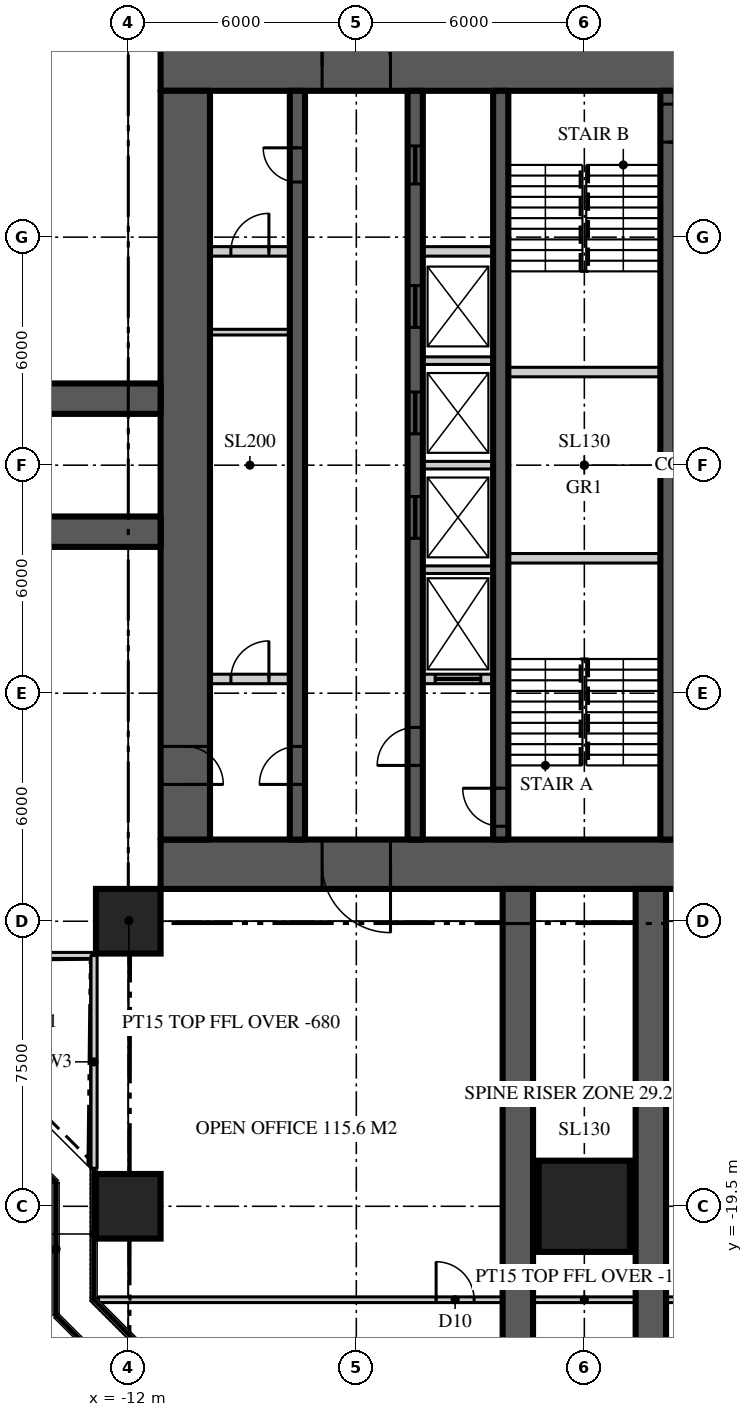
"""IFC4 building model, lengths in metres.
Left out: names, types, materials, properties, quantities, classifications, styles, units other than length and angle.
Written with IfcOpenShell. Run it as: python <this file> out.ifc"""

import sys

from ifc_helpers import new_model, si_unit, direction, frame, frame_2d, origin, origin_2d, place, context, subcontext, project, spatial, rectangle, extrude, element, fill, save


model = new_model("IFC4")
c1 = context("Model", 3, precision=1e-05, world=origin(), true_north=direction((0.0, 1.0)))
c2 = subcontext(c1, "Body", "Model", "MODEL_VIEW")
j1 = project(units=[si_unit("LENGTHUNIT", "METRE"), si_unit("PLANEANGLEUNIT", "RADIAN")], contexts=[c1])
p1 = place(None, origin())
s1 = spatial("IfcSite", under=j1, at=p1, CompositionType="ELEMENT")
p2 = place(p1, origin())
s2 = spatial("IfcBuilding", under=s1, at=p2, CompositionType="ELEMENT")
p3 = place(p2, frame((0.0, 0.0, 178.8)))
s3 = spatial("IfcBuildingStorey", under=s2, at=p3, CompositionType="ELEMENT", Elevation=178.8)
p4 = place(p3, frame((-11.15, 10.5, 0.0), z_axis=(0.0, 0.0, 1.0), x_axis=(1.0, 0.0, 0.0)))
e1 = element("IfcWall", 1, at=p4, inside=s3, PredefinedType="SHEAR", context=c2, shape_type="SweptSolid", body=[
    extrude(rectangle(XDim=22.3, YDim=1.3, at=frame_2d((11.15, 0.0))), origin(), (0.0, 0.0, 1.0), 3.9),
])
p5 = place(p4, frame((4.25, 0.0, 0.0)))
e2 = element("IfcOpeningElement", 2, at=p5, cuts=e1, PredefinedType="OPENING", context=c2, shape_type="SweptSolid", body=[
    extrude(rectangle(XDim=1.8, YDim=2.2, at=frame_2d((0.9, 1.1))), frame((0.0, 0.66, 0.0), z_axis=(0.0, -1.0, 0.0), x_axis=(1.0, 0.0, 0.0)), (0.0, 0.0, 1.0), 1.32),
])
p6 = place(p4, frame((16.25, 0.0, 0.0)))
e3 = element("IfcOpeningElement", 3, at=p6, cuts=e1, PredefinedType="OPENING", context=c2, shape_type="SweptSolid", body=[
    extrude(rectangle(XDim=1.8, YDim=2.2, at=frame_2d((0.9, 1.1))), frame((0.0, 0.66, 0.0), z_axis=(0.0, -1.0, 0.0), x_axis=(1.0, 0.0, 0.0)), (0.0, 0.0, 1.0), 1.32),
])
p7 = place(p3, frame((11.15, -10.5, 0.0), z_axis=(0.0, 0.0, 1.0), x_axis=(-1.0, 0.0, 0.0)))
e4 = element("IfcWall", 4, at=p7, inside=s3, PredefinedType="SHEAR", context=c2, shape_type="SweptSolid", body=[
    extrude(rectangle(XDim=22.3, YDim=1.3, at=frame_2d((11.15, 0.0))), origin(), (0.0, 0.0, 1.0), 3.9),
])
p8 = place(p7, frame((16.25, 0.0, 0.0)))
e5 = element("IfcOpeningElement", 5, at=p8, cuts=e4, PredefinedType="OPENING", context=c2, shape_type="SweptSolid", body=[
    extrude(rectangle(XDim=1.8, YDim=2.2, at=frame_2d((0.9, 1.1))), frame((0.0, 0.66, 0.0), z_axis=(0.0, -1.0, 0.0), x_axis=(1.0, 0.0, 0.0)), (0.0, 0.0, 1.0), 1.32),
])
p9 = place(p7, frame((4.25, 0.0, 0.0)))
e6 = element("IfcOpeningElement", 6, at=p9, cuts=e4, PredefinedType="OPENING", context=c2, shape_type="SweptSolid", body=[
    extrude(rectangle(XDim=1.8, YDim=2.2, at=frame_2d((0.9, 1.1))), frame((0.0, 0.66, 0.0), z_axis=(0.0, -1.0, 0.0), x_axis=(1.0, 0.0, 0.0)), (0.0, 0.0, 1.0), 1.32),
])
p10 = place(p3, frame((-10.5, 9.85, 0.0), z_axis=(0.0, 0.0, 1.0), x_axis=(0.0, -1.0, 0.0)))
e7 = element("IfcWall", 7, at=p10, inside=s3, PredefinedType="SHEAR", context=c2, shape_type="SweptSolid", body=[
    extrude(rectangle(XDim=19.7, YDim=1.3, at=frame_2d((9.85, 0.0))), origin(), (0.0, 0.0, 1.0), 3.9),
])
p11 = place(p10, frame((17.25, 0.0, 0.0)))
e8 = element("IfcOpeningElement", 8, at=p11, cuts=e7, PredefinedType="OPENING", context=c2, shape_type="SweptSolid", body=[
    extrude(rectangle(XDim=1.0, YDim=2.2, at=frame_2d((0.5, 1.1))), frame((0.0, 0.66, 0.0), z_axis=(0.0, -1.0, 0.0), x_axis=(1.0, 0.0, 0.0)), (0.0, 0.0, 1.0), 1.32),
])
for number, where, z_axis, x_axis in (
    (9, (-11.15, 1.75, 0.0), (0.0, 0.0, 1.0), (-1.0, 0.0, 0.0)),
    (10, (-11.15, -1.75, 0.0), (0.0, 0.0, 1.0), (-1.0, 0.0, 0.0)),
    (11, (-1.75, -11.15, 0.0), (0.0, 0.0, 1.0), (0.0, -1.0, 0.0)),
    (12, (1.75, -11.15, 0.0), (0.0, 0.0, 1.0), (0.0, -1.0, 0.0)),
):
    element("IfcWall", number, at=place(p3, frame(where, z_axis=z_axis, x_axis=x_axis)), inside=s3, PredefinedType="SHEAR", context=c2, shape_type="SweptSolid", body=[
        extrude(rectangle(XDim=15.25, YDim=0.8, at=frame_2d((7.625, 0.0))), origin(), (0.0, 0.0, 1.0), 3.9),
    ])
p12 = place(p3, frame((-12.0, -19.5, 0.0), z_axis=(0.0, 0.0, 1.0), x_axis=(1.0, 0.0, 0.0)))
e13 = element("IfcColumn", 13, at=p12, inside=s3, PredefinedType="COLUMN", context=c2, shape_type="SweptSolid", body=[
    extrude(rectangle(XDim=1.7, YDim=1.7, at=origin_2d()), origin(), (0.0, 0.0, 1.0), 3.9),
])
p13 = place(p3, frame((0.0, -19.5, 0.0), z_axis=(0.0, 0.0, 1.0), x_axis=(1.0, 0.0, 0.0)))
e14 = element("IfcColumn", 14, at=p13, inside=s3, PredefinedType="COLUMN", context=c2, shape_type="SweptSolid", body=[
    extrude(rectangle(XDim=2.4, YDim=2.4, at=origin_2d()), origin(), (0.0, 0.0, 1.0), 3.9),
])
p14 = place(p3, frame((-12.0, -12.0, 0.0), z_axis=(0.0, 0.0, 1.0), x_axis=(1.0, 0.0, 0.0)))
e15 = element("IfcColumn", 15, at=p14, inside=s3, PredefinedType="COLUMN", context=c2, shape_type="SweptSolid", body=[
    extrude(rectangle(XDim=1.7, YDim=1.7, at=origin_2d()), origin(), (0.0, 0.0, 1.0), 3.9),
])
p15 = place(p3, frame((-18.5, -12.9, 0.0), z_axis=(0.0, 0.0, 1.0), x_axis=(1.0, 0.0, 0.0)))
e16 = element("IfcWall", 16, at=p15, inside=s3, PredefinedType="SOLIDWALL", context=c2, shape_type="SweptSolid", body=[
    extrude(rectangle(XDim=5.6, YDim=0.16, at=frame_2d((2.8, 0.0))), origin(), (0.0, 0.0, 1.0), 3.77),
])
p16 = place(p15, frame((2.3, 0.0, 0.0)))
e17 = element("IfcOpeningElement", 17, at=p16, cuts=e16, PredefinedType="OPENING", context=c2, shape_type="SweptSolid", body=[
    extrude(rectangle(XDim=1.0, YDim=2.2, at=frame_2d((0.5, 1.1))), frame((0.0, 0.09, 0.0), z_axis=(0.0, -1.0, 0.0), x_axis=(1.0, 0.0, 0.0)), (0.0, 0.0, 1.0), 0.18),
])
p17 = place(p3, frame((-12.9, -12.9, 0.0), z_axis=(0.0, 0.0, 1.0), x_axis=(0.0, -1.0, 0.0)))
e18 = element("IfcWall", 18, at=p17, inside=s3, PredefinedType="SOLIDWALL", context=c2, shape_type="SweptSolid", body=[
    extrude(rectangle(XDim=5.6, YDim=0.16, at=frame_2d((2.8, 0.0))), origin(), (0.0, 0.0, 1.0), 3.77),
])
p18 = place(p3, frame((-7.55, -9.85, 0.0), z_axis=(0.0, 0.0, 1.0), x_axis=(0.0, 1.0, 0.0)))
e19 = element("IfcWall", 19, at=p18, inside=s3, PredefinedType="SHEAR", context=c2, shape_type="SweptSolid", body=[
    extrude(rectangle(XDim=19.7, YDim=0.4, at=frame_2d((9.85, 0.0))), origin(), (0.0, 0.0, 1.0), 3.9),
])
p19 = place(p18, frame((1.45, 0.0, 0.0)))
e20 = element("IfcOpeningElement", 20, at=p19, cuts=e19, PredefinedType="OPENING", context=c2, shape_type="SweptSolid", body=[
    extrude(rectangle(XDim=1.0, YDim=2.2, at=frame_2d((0.5, 1.1))), frame((0.0, 0.21, 0.0), z_axis=(0.0, -1.0, 0.0), x_axis=(1.0, 0.0, 0.0)), (0.0, 0.0, 1.0), 0.42),
])
p20 = place(p18, frame((17.3, 0.0, 0.0)))
e21 = element("IfcOpeningElement", 21, at=p20, cuts=e19, PredefinedType="OPENING", context=c2, shape_type="SweptSolid", body=[
    extrude(rectangle(XDim=0.9, YDim=2.1, at=frame_2d((0.45, 1.05))), frame((0.0, 0.21, 0.0), z_axis=(0.0, -1.0, 0.0), x_axis=(1.0, 0.0, 0.0)), (0.0, 0.0, 1.0), 0.42),
])
p21 = place(p3, frame((-4.45, -9.85, 0.0), z_axis=(0.0, 0.0, 1.0), x_axis=(0.0, 1.0, 0.0)))
e22 = element("IfcWall", 22, at=p21, inside=s3, PredefinedType="SHEAR", context=c2, shape_type="SweptSolid", body=[
    extrude(rectangle(XDim=19.7, YDim=0.4, at=frame_2d((9.85, 0.0))), origin(), (0.0, 0.0, 1.0), 3.9),
])
p22 = place(p21, frame((1.95, 0.0, 0.0)))
e23 = element("IfcOpeningElement", 23, at=p22, cuts=e22, PredefinedType="OPENING", context=c2, shape_type="SweptSolid", body=[
    extrude(rectangle(XDim=1.0, YDim=2.2, at=frame_2d((0.5, 1.1))), frame((0.0, 0.21, 0.0), z_axis=(0.0, -1.0, 0.0), x_axis=(1.0, 0.0, 0.0)), (0.0, 0.0, 1.0), 0.42),
])
p23 = place(p21, frame((17.25, 0.0, 0.0)))
e24 = element("IfcOpeningElement", 24, at=p23, cuts=e22, PredefinedType="OPENING", context=c2, shape_type="SweptSolid", body=[
    extrude(rectangle(XDim=1.0, YDim=2.1, at=frame_2d((0.5, 1.05))), frame((0.0, 0.21, 0.0), z_axis=(0.0, -1.0, 0.0), x_axis=(1.0, 0.0, 0.0)), (0.0, 0.0, 1.0), 0.42),
])
p24 = place(p21, frame((7.925, 0.0, 0.0)))
e25 = element("IfcOpeningElement", 25, at=p24, cuts=e22, PredefinedType="OPENING", context=c2, shape_type="SweptSolid", body=[
    extrude(rectangle(XDim=1.1, YDim=2.2, at=frame_2d((0.55, 1.1))), frame((0.0, 0.21, 0.0), z_axis=(0.0, -1.0, 0.0), x_axis=(1.0, 0.0, 0.0)), (0.0, 0.0, 1.0), 0.42),
])
p25 = place(p21, frame((10.675, 0.0, 0.0)))
e26 = element("IfcOpeningElement", 26, at=p25, cuts=e22, PredefinedType="OPENING", context=c2, shape_type="SweptSolid", body=[
    extrude(rectangle(XDim=1.1, YDim=2.2, at=frame_2d((0.55, 1.1))), frame((0.0, 0.21, 0.0), z_axis=(0.0, -1.0, 0.0), x_axis=(1.0, 0.0, 0.0)), (0.0, 0.0, 1.0), 0.42),
])
p26 = place(p21, frame((13.475, 0.0, 0.0)))
e27 = element("IfcOpeningElement", 27, at=p26, cuts=e22, PredefinedType="OPENING", context=c2, shape_type="SweptSolid", body=[
    extrude(rectangle(XDim=1.1, YDim=2.2, at=frame_2d((0.55, 1.1))), frame((0.0, 0.21, 0.0), z_axis=(0.0, -1.0, 0.0), x_axis=(1.0, 0.0, 0.0)), (0.0, 0.0, 1.0), 0.42),
])
p27 = place(p3, frame((-2.2, -9.85, 0.0), z_axis=(0.0, 0.0, 1.0), x_axis=(0.0, 1.0, 0.0)))
e28 = element("IfcWall", 28, at=p27, inside=s3, PredefinedType="SHEAR", context=c2, shape_type="SweptSolid", body=[
    extrude(rectangle(XDim=19.7, YDim=0.4, at=frame_2d((9.85, 0.0))), origin(), (0.0, 0.0, 1.0), 3.9),
])
p28 = place(p27, frame((0.35, 0.0, 0.0)))
e29 = element("IfcOpeningElement", 29, at=p28, cuts=e28, PredefinedType="OPENING", context=c2, shape_type="SweptSolid", body=[
    extrude(rectangle(XDim=1.0, YDim=2.2, at=frame_2d((0.5, 1.1))), frame((0.0, 0.21, 0.0), z_axis=(0.0, -1.0, 0.0), x_axis=(1.0, 0.0, 0.0)), (0.0, 0.0, 1.0), 0.42),
])
p29 = place(p3, frame((2.2, 9.85, 0.0), z_axis=(0.0, 0.0, 1.0), x_axis=(0.0, -1.0, 0.0)))
e30 = element("IfcWall", 30, at=p29, inside=s3, PredefinedType="SHEAR", context=c2, shape_type="SweptSolid", body=[
    extrude(rectangle(XDim=19.7, YDim=0.4, at=frame_2d((9.85, 0.0))), origin(), (0.0, 0.0, 1.0), 3.9),
])
p30 = place(p29, frame((0.35, 0.0, 0.0)))
e31 = element("IfcOpeningElement", 31, at=p30, cuts=e30, PredefinedType="OPENING", context=c2, shape_type="SweptSolid", body=[
    extrude(rectangle(XDim=1.0, YDim=2.2, at=frame_2d((0.5, 1.1))), frame((0.0, 0.21, 0.0), z_axis=(0.0, -1.0, 0.0), x_axis=(1.0, 0.0, 0.0)), (0.0, 0.0, 1.0), 0.42),
])
p31 = place(p3, frame((-9.85, 5.625, 0.0), z_axis=(0.0, 0.0, 1.0), x_axis=(1.0, 0.0, 0.0)))
e32 = element("IfcWall", 32, at=p31, inside=s3, PredefinedType="SOLIDWALL", context=c2, shape_type="SweptSolid", body=[
    extrude(rectangle(XDim=2.1, YDim=0.25, at=frame_2d((1.05, 0.0))), origin(), (0.0, 0.0, 1.0), 3.7),
])
p32 = place(p31, frame((0.55, 0.0, 0.0)))
e33 = element("IfcOpeningElement", 33, at=p32, cuts=e32, PredefinedType="OPENING", context=c2, shape_type="SweptSolid", body=[
    extrude(rectangle(XDim=1.0, YDim=2.2, at=frame_2d((0.5, 1.1))), frame((0.0, 0.135, 0.0), z_axis=(0.0, -1.0, 0.0), x_axis=(1.0, 0.0, 0.0)), (0.0, 0.0, 1.0), 0.27),
])
p33 = place(p3, frame((-4.25, 5.625, 0.0), z_axis=(0.0, 0.0, 1.0), x_axis=(1.0, 0.0, 0.0)))
e34 = element("IfcWall", 34, at=p33, inside=s3, PredefinedType="SOLIDWALL", context=c2, shape_type="SweptSolid", body=[
    extrude(rectangle(XDim=1.85, YDim=0.25, at=frame_2d((0.925, 0.0))), origin(), (0.0, 0.0, 1.0), 3.7),
])
p34 = place(p3, frame((-9.85, -5.625, 0.0), z_axis=(0.0, 0.0, 1.0), x_axis=(1.0, 0.0, 0.0)))
e35 = element("IfcWall", 35, at=p34, inside=s3, PredefinedType="SOLIDWALL", context=c2, shape_type="SweptSolid", body=[
    extrude(rectangle(XDim=2.1, YDim=0.25, at=frame_2d((1.05, 0.0))), origin(), (0.0, 0.0, 1.0), 3.7),
])
p35 = place(p34, frame((0.55, 0.0, 0.0)))
e36 = element("IfcOpeningElement", 36, at=p35, cuts=e35, PredefinedType="OPENING", context=c2, shape_type="SweptSolid", body=[
    extrude(rectangle(XDim=1.0, YDim=2.2, at=frame_2d((0.5, 1.1))), frame((0.0, 0.135, 0.0), z_axis=(0.0, -1.0, 0.0), x_axis=(1.0, 0.0, 0.0)), (0.0, 0.0, 1.0), 0.27),
])
p36 = place(p3, frame((-4.25, -5.625, 0.0), z_axis=(0.0, 0.0, 1.0), x_axis=(1.0, 0.0, 0.0)))
e37 = element("IfcWall", 37, at=p36, inside=s3, PredefinedType="SOLIDWALL", context=c2, shape_type="SweptSolid", body=[
    extrude(rectangle(XDim=1.85, YDim=0.25, at=frame_2d((0.925, 0.0))), origin(), (0.0, 0.0, 1.0), 3.7),
])
p37 = place(p36, frame((0.325, 0.0, 0.0)))
e38 = element("IfcOpeningElement", 38, at=p37, cuts=e37, PredefinedType="OPENING", context=c2, shape_type="SweptSolid", body=[
    extrude(rectangle(XDim=1.2, YDim=2.2, at=frame_2d((0.6, 1.1))), frame((0.0, 0.135, 0.0), z_axis=(0.0, -1.0, 0.0), x_axis=(1.0, 0.0, 0.0)), (0.0, 0.0, 1.0), 0.27),
])
for number, where, z_axis, x_axis in (
    (39, (-2.0, -2.45, 0.0), (0.0, 0.0, 1.0), (1.0, 0.0, 0.0)),
    (40, (-2.0, 2.45, 0.0), (0.0, 0.0, 1.0), (1.0, 0.0, 0.0)),
):
    element("IfcWall", number, at=place(p3, frame(where, z_axis=z_axis, x_axis=x_axis)), inside=s3, PredefinedType="SOLIDWALL", context=c2, shape_type="SweptSolid", body=[
        extrude(rectangle(XDim=4.0, YDim=0.25, at=frame_2d((2.0, 0.0))), origin(), (0.0, 0.0, 1.0), 3.7),
    ])
for number, where, z_axis, x_axis in (
    (41, (-4.25, -2.75, 0.0), (0.0, 0.0, 1.0), (1.0, 0.0, 0.0)),
    (42, (-4.25, 0.0, 0.0), (0.0, 0.0, 1.0), (1.0, 0.0, 0.0)),
    (43, (-4.25, 2.75, 0.0), (0.0, 0.0, 1.0), (1.0, 0.0, 0.0)),
):
    element("IfcWall", number, at=place(p3, frame(where, z_axis=z_axis, x_axis=x_axis)), inside=s3, PredefinedType="SOLIDWALL", context=c2, shape_type="SweptSolid", body=[
        extrude(rectangle(XDim=1.85, YDim=0.2, at=frame_2d((0.925, 0.0))), origin(), (0.0, 0.0, 1.0), 3.7),
    ])
p38 = place(p3, frame((-12.786, -21.959, 0.0), z_axis=(0.0, 0.0, 1.0), x_axis=(1.0, 0.0, 0.0)))
e44 = element("IfcWall", 44, at=p38, inside=s3, PredefinedType="PARTITIONING", context=c2, shape_type="SweptSolid", body=[
    extrude(rectangle(XDim=25.573, YDim=0.15, at=frame_2d((12.786, 0.0))), origin(), (0.0, 0.0, 1.0), 3.77),
])
p39 = place(p38, frame((15.687, 0.0, 0.0)))
e45 = element("IfcOpeningElement", 45, at=p39, cuts=e44, PredefinedType="OPENING", context=c2, shape_type="SweptSolid", body=[
    extrude(rectangle(XDim=1.0, YDim=2.2, at=frame_2d((0.5, 1.1))), frame((0.0, 0.085, 0.0), z_axis=(0.0, -1.0, 0.0), x_axis=(1.0, 0.0, 0.0)), (0.0, 0.0, 1.0), 0.17),
])
p40 = place(p38, frame((8.886, 0.0, 0.0)))
e46 = element("IfcOpeningElement", 46, at=p40, cuts=e44, PredefinedType="OPENING", context=c2, shape_type="SweptSolid", body=[
    extrude(rectangle(XDim=1.0, YDim=2.2, at=frame_2d((0.5, 1.1))), frame((0.0, 0.085, 0.0), z_axis=(0.0, -1.0, 0.0), x_axis=(1.0, 0.0, 0.0)), (0.0, 0.0, 1.0), 0.17),
])
p41 = place(p3, frame((-11.15, -11.15, 0.0), z_axis=(0.0, 0.0, 1.0), x_axis=(-0.707106781187, -0.707106781187, 0.0)))
e47 = element("IfcWall", 47, at=p41, inside=s3, PredefinedType="PARTITIONING", context=c2, shape_type="SweptSolid", body=[
    extrude(rectangle(XDim=2.362, YDim=0.15, at=frame_2d((1.181, 0.0))), origin(), (0.0, 0.0, 1.0), 3.22),
])
p42 = place(p3, frame((-9.85, 3.5, 0.0), z_axis=(0.0, 0.0, 1.0), x_axis=(1.0, 0.0, 0.0)))
e48 = element("IfcWall", 48, at=p42, inside=s3, PredefinedType="SOLIDWALL", context=c2, shape_type="SweptSolid", body=[
    extrude(rectangle(XDim=2.1, YDim=0.15, at=frame_2d((1.05, 0.0))), origin(), (0.0, 0.0, 1.0), 3.77),
])
p43 = place(p5, origin())
e49 = element("IfcDoor", 49, at=p43, inside=s3, OperationType="DOUBLE_DOOR_DOUBLE_SWING", PredefinedType="DOOR", context=c2, shape_type="SweptSolid", body=[
    extrude(rectangle(XDim=1.8, YDim=2.2, at=frame_2d((0.9, 1.1))), frame((0.0, 0.025, 0.0), z_axis=(0.0, -1.0, 0.0), x_axis=(1.0, 0.0, 0.0)), (0.0, 0.0, 1.0), 0.05),
])
fill(e2, e49)
p44 = place(p8, origin())
e50 = element("IfcDoor", 50, at=p44, inside=s3, OperationType="DOUBLE_DOOR_DOUBLE_SWING", PredefinedType="DOOR", context=c2, shape_type="SweptSolid", body=[
    extrude(rectangle(XDim=1.8, YDim=2.2, at=frame_2d((0.9, 1.1))), frame((0.0, 0.025, 0.0), z_axis=(0.0, -1.0, 0.0), x_axis=(1.0, 0.0, 0.0)), (0.0, 0.0, 1.0), 0.05),
])
fill(e5, e50)
p45 = place(p19, origin())
e51 = element("IfcDoor", 51, at=p45, inside=s3, OperationType="SINGLE_SWING_LEFT", PredefinedType="DOOR", context=c2, shape_type="SweptSolid", body=[
    extrude(rectangle(XDim=1.0, YDim=2.2, at=frame_2d((0.5, 1.1))), frame((0.0, 0.025, 0.0), z_axis=(0.0, -1.0, 0.0), x_axis=(1.0, 0.0, 0.0)), (0.0, 0.0, 1.0), 0.05),
])
fill(e20, e51)
p46 = place(p11, origin())
e52 = element("IfcDoor", 52, at=p46, inside=s3, OperationType="SINGLE_SWING_RIGHT", PredefinedType="DOOR", context=c2, shape_type="SweptSolid", body=[
    extrude(rectangle(XDim=1.0, YDim=2.2, at=frame_2d((0.5, 1.1))), frame((0.0, 0.025, 0.0), z_axis=(0.0, -1.0, 0.0), x_axis=(1.0, 0.0, 0.0)), (0.0, 0.0, 1.0), 0.05),
])
fill(e8, e52)
p47 = place(p22, origin())
e53 = element("IfcDoor", 53, at=p47, inside=s3, OperationType="SINGLE_SWING_LEFT", PredefinedType="DOOR", context=c2, shape_type="SweptSolid", body=[
    extrude(rectangle(XDim=1.0, YDim=2.2, at=frame_2d((0.5, 1.1))), frame((0.0, 0.025, 0.0), z_axis=(0.0, -1.0, 0.0), x_axis=(1.0, 0.0, 0.0)), (0.0, 0.0, 1.0), 0.05),
])
fill(e23, e53)
p48 = place(p28, origin())
e54 = element("IfcDoor", 54, at=p48, inside=s3, OperationType="SINGLE_SWING_RIGHT", PredefinedType="DOOR", context=c2, shape_type="SweptSolid", body=[
    extrude(rectangle(XDim=1.0, YDim=2.2, at=frame_2d((0.5, 1.1))), frame((0.0, 0.025, 0.0), z_axis=(0.0, -1.0, 0.0), x_axis=(1.0, 0.0, 0.0)), (0.0, 0.0, 1.0), 0.05),
])
fill(e29, e54)
p49 = place(p30, origin())
e55 = element("IfcDoor", 55, at=p49, inside=s3, OperationType="SINGLE_SWING_RIGHT", PredefinedType="DOOR", context=c2, shape_type="SweptSolid", body=[
    extrude(rectangle(XDim=1.0, YDim=2.2, at=frame_2d((0.5, 1.1))), frame((0.0, 0.025, 0.0), z_axis=(0.0, -1.0, 0.0), x_axis=(1.0, 0.0, 0.0)), (0.0, 0.0, 1.0), 0.05),
])
fill(e31, e55)
p50 = place(p20, origin())
e56 = element("IfcDoor", 56, at=p50, inside=s3, OperationType="SINGLE_SWING_RIGHT", PredefinedType="DOOR", context=c2, shape_type="SweptSolid", body=[
    extrude(rectangle(XDim=0.9, YDim=2.1, at=frame_2d((0.45, 1.05))), frame((0.0, 0.025, 0.0), z_axis=(0.0, -1.0, 0.0), x_axis=(1.0, 0.0, 0.0)), (0.0, 0.0, 1.0), 0.05),
])
fill(e21, e56)
p51 = place(p23, origin())
e57 = element("IfcDoor", 57, at=p51, inside=s3, OperationType="SLIDING_TO_LEFT", PredefinedType="DOOR", context=c2, shape_type="SweptSolid", body=[
    extrude(rectangle(XDim=1.0, YDim=2.1, at=frame_2d((0.5, 1.05))), frame((0.0, 0.025, 0.0), z_axis=(0.0, -1.0, 0.0), x_axis=(1.0, 0.0, 0.0)), (0.0, 0.0, 1.0), 0.05),
])
fill(e24, e57)
p52 = place(p24, origin())
e58 = element("IfcDoor", 58, at=p52, inside=s3, OperationType="SLIDING_TO_LEFT", PredefinedType="DOOR", context=c2, shape_type="SweptSolid", body=[
    extrude(rectangle(XDim=1.1, YDim=2.2, at=frame_2d((0.55, 1.1))), frame((0.0, 0.025, 0.0), z_axis=(0.0, -1.0, 0.0), x_axis=(1.0, 0.0, 0.0)), (0.0, 0.0, 1.0), 0.05),
])
fill(e25, e58)
p53 = place(p25, origin())
e59 = element("IfcDoor", 59, at=p53, inside=s3, OperationType="SLIDING_TO_LEFT", PredefinedType="DOOR", context=c2, shape_type="SweptSolid", body=[
    extrude(rectangle(XDim=1.1, YDim=2.2, at=frame_2d((0.55, 1.1))), frame((0.0, 0.025, 0.0), z_axis=(0.0, -1.0, 0.0), x_axis=(1.0, 0.0, 0.0)), (0.0, 0.0, 1.0), 0.05),
])
fill(e26, e59)
p54 = place(p26, origin())
e60 = element("IfcDoor", 60, at=p54, inside=s3, OperationType="SLIDING_TO_LEFT", PredefinedType="DOOR", context=c2, shape_type="SweptSolid", body=[
    extrude(rectangle(XDim=1.1, YDim=2.2, at=frame_2d((0.55, 1.1))), frame((0.0, 0.025, 0.0), z_axis=(0.0, -1.0, 0.0), x_axis=(1.0, 0.0, 0.0)), (0.0, 0.0, 1.0), 0.05),
])
fill(e27, e60)
p55 = place(p37, origin())
e61 = element("IfcDoor", 61, at=p55, inside=s3, OperationType="SLIDING_TO_LEFT", PredefinedType="DOOR", context=c2, shape_type="SweptSolid", body=[
    extrude(rectangle(XDim=1.2, YDim=2.2, at=frame_2d((0.6, 1.1))), frame((0.0, 0.025, 0.0), z_axis=(0.0, -1.0, 0.0), x_axis=(1.0, 0.0, 0.0)), (0.0, 0.0, 1.0), 0.05),
])
fill(e38, e61)
p56 = place(p40, origin())
e62 = element("IfcDoor", 62, at=p56, inside=s3, OperationType="SINGLE_SWING_LEFT", PredefinedType="DOOR", context=c2, shape_type="SweptSolid", body=[
    extrude(rectangle(XDim=1.0, YDim=2.2, at=frame_2d((0.5, 1.1))), frame((0.0, 0.025, 0.0), z_axis=(0.0, -1.0, 0.0), x_axis=(1.0, 0.0, 0.0)), (0.0, 0.0, 1.0), 0.05),
])
fill(e46, e62)
p57 = place(p32, origin())
e63 = element("IfcDoor", 63, at=p57, inside=s3, OperationType="SINGLE_SWING_RIGHT", PredefinedType="DOOR", context=c2, shape_type="SweptSolid", body=[
    extrude(rectangle(XDim=1.0, YDim=2.2, at=frame_2d((0.5, 1.1))), frame((0.0, 0.025, 0.0), z_axis=(0.0, -1.0, 0.0), x_axis=(1.0, 0.0, 0.0)), (0.0, 0.0, 1.0), 0.05),
])
fill(e33, e63)
p58 = place(p35, origin())
e64 = element("IfcDoor", 64, at=p58, inside=s3, OperationType="SINGLE_SWING_RIGHT", PredefinedType="DOOR", context=c2, shape_type="SweptSolid", body=[
    extrude(rectangle(XDim=1.0, YDim=2.2, at=frame_2d((0.5, 1.1))), frame((0.0, 0.025, 0.0), z_axis=(0.0, -1.0, 0.0), x_axis=(1.0, 0.0, 0.0)), (0.0, 0.0, 1.0), 0.05),
])
fill(e36, e64)
save(model, sys.argv[1])
